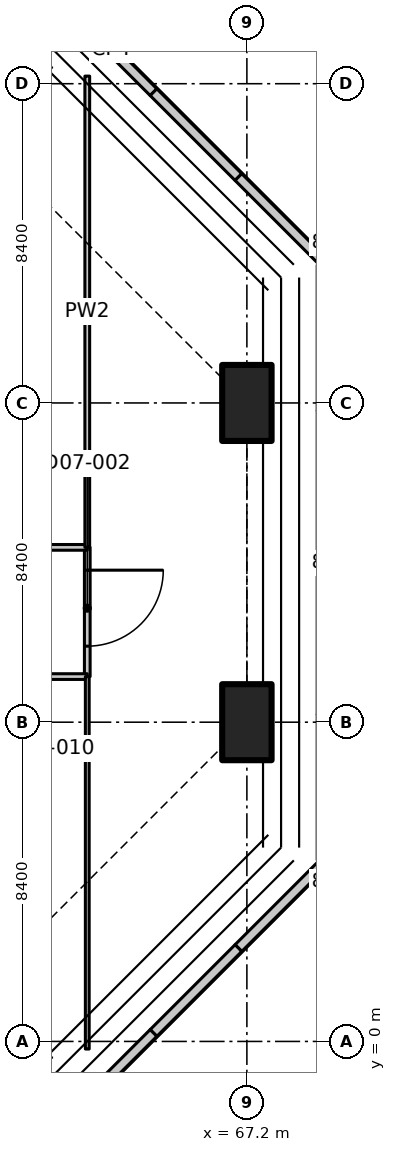
"""IFC4 building model, lengths in metres.
Left out: names, types, materials, properties, quantities, classifications, styles, units other than length and angle.
Written with IfcOpenShell. Run it as: python <this file> out.ifc"""

import sys

from ifc_helpers import new_model, si_unit, direction, frame, frame_2d, origin, origin_2d, place, context, subcontext, project, spatial, polyline, rectangle, outline, extrude, element, fill, save


model = new_model("IFC4")
c1 = context("Model", 3, precision=1e-05, world=origin(), true_north=direction((0.0, 1.0)))
c2 = subcontext(c1, "Body", "Model", "MODEL_VIEW")
j1 = project(units=[si_unit("LENGTHUNIT", "METRE"), si_unit("PLANEANGLEUNIT", "RADIAN")], contexts=[c1])
p1 = place(None, origin())
s1 = spatial("IfcSite", under=j1, at=p1, CompositionType="ELEMENT")
p2 = place(p1, origin())
s2 = spatial("IfcBuilding", under=s1, at=p2, CompositionType="ELEMENT")
p3 = place(p2, frame((0.0, 0.0, 36.5)))
s3 = spatial("IfcBuildingStorey", under=s2, at=p3, CompositionType="ELEMENT", Elevation=36.5)
for number, where, z_axis, x_axis in (
    (1, (67.2, 8.4, 0.0), (0.0, 0.0, 1.0), (1.0, 0.0, 0.0)),
    (2, (67.2, 16.8, 0.0), (0.0, 0.0, 1.0), (1.0, 0.0, 0.0)),
):
    element("IfcColumn", number, at=place(p3, frame(where, z_axis=z_axis, x_axis=x_axis)), inside=s3, PredefinedType="COLUMN", context=c2, shape_type="SweptSolid", body=[
        extrude(rectangle(XDim=1.3, YDim=2.0, at=origin_2d()), origin(), (0.0, 0.0, 1.0), 3.35),
    ])
p4 = place(p3, frame((62.509, 27.212, 0.0), z_axis=(0.0, 0.0, 1.0), x_axis=(0.70706814675, -0.707145413513, 0.0)))
e3 = element("IfcWall", 3, at=p4, inside=s3, PredefinedType="PARAPET", context=c2, shape_type="SweptSolid", body=[
    extrude(rectangle(XDim=3.16, YDim=0.25, at=frame_2d((1.58, 0.0))), origin(), (0.0, 0.0, 1.0), 1.1),
])
p5 = place(p3, frame((64.743, 24.977, 0.0), z_axis=(0.0, 0.0, 1.0), x_axis=(0.707106781187, -0.707106781187, 0.0)))
e4 = element("IfcWall", 4, at=p5, inside=s3, PredefinedType="PARAPET", context=c2, shape_type="SweptSolid", body=[
    extrude(rectangle(XDim=3.16, YDim=0.25, at=frame_2d((1.58, 0.0))), origin(), (0.0, 0.0, 1.0), 1.1),
])
p6 = place(p3, frame((66.977, 22.743, 0.0), z_axis=(0.0, 0.0, 1.0), x_axis=(0.707145413513, -0.70706814675, 0.0)))
e5 = element("IfcWall", 5, at=p6, inside=s3, PredefinedType="PARAPET", context=c2, shape_type="SweptSolid", body=[
    extrude(rectangle(XDim=3.16, YDim=0.25, at=frame_2d((1.58, 0.0))), origin(), (0.0, 0.0, 1.0), 1.1),
])
for number, where, z_axis, x_axis in (
    (6, (69.212, 4.691, 0.0), (0.0, 0.0, 1.0), (-0.707, -0.707, 0.0)),
    (7, (66.977, 2.457, 0.0), (0.0, 0.0, 1.0), (-0.707, -0.707, 0.0)),
):
    element("IfcWall", number, at=place(p3, frame(where, z_axis=z_axis, x_axis=x_axis)), inside=s3, PredefinedType="PARAPET", context=c2, shape_type="SweptSolid", body=[
        extrude(rectangle(XDim=3.16, YDim=0.25, at=frame_2d((1.58, 0.0))), origin(), (0.0, 0.0, 1.0), 1.1),
    ])
p7 = place(p3, frame((64.743, 0.223, 0.0), z_axis=(0.0, 0.0, 1.0), x_axis=(-0.70706814675, -0.707145413513, 0.0)))
e8 = element("IfcWall", 8, at=p7, inside=s3, PredefinedType="PARAPET", context=c2, shape_type="SweptSolid", body=[
    extrude(rectangle(XDim=3.16, YDim=0.25, at=frame_2d((1.58, 0.0))), origin(), (0.0, 0.0, 1.0), 1.1),
])
p8 = place(p3, frame((63.0, 13.0, 0.0), z_axis=(0.0, 0.0, 1.0), x_axis=(0.0, -1.0, 0.0)))
e9 = element("IfcWall", 9, at=p8, inside=s3, PredefinedType="PARTITIONING", context=c2, shape_type="SweptSolid", body=[
    extrude(rectangle(XDim=3.4, YDim=0.15, at=frame_2d((1.7, 0.0))), origin(), (0.0, 0.0, 1.0), 3.33),
])
p9 = place(p8, frame((0.6, 0.0, 0.0)))
e10 = element("IfcOpeningElement", 10, at=p9, cuts=e9, PredefinedType="OPENING", context=c2, shape_type="SweptSolid", body=[
    extrude(rectangle(XDim=2.0, YDim=2.4, at=frame_2d((1.0, 1.2))), frame((0.0, 0.085, 0.0), z_axis=(0.0, -1.0, 0.0), x_axis=(1.0, 0.0, 0.0)), (0.0, 0.0, 1.0), 0.17),
])
p10 = place(p3, frame((63.0, 9.6, 0.0), z_axis=(0.0, 0.0, 1.0), x_axis=(-1.0, 0.0, 0.0)))
e11 = element("IfcWall", 11, at=p10, inside=s3, PredefinedType="PARTITIONING", context=c2, shape_type="SweptSolid", body=[
    extrude(rectangle(XDim=4.2, YDim=0.15, at=frame_2d((2.1, 0.0))), origin(), (0.0, 0.0, 1.0), 3.33),
])
p11 = place(p10, frame((1.5, 0.0, 0.0)))
e12 = element("IfcOpeningElement", 12, at=p11, cuts=e11, PredefinedType="OPENING", context=c2, shape_type="SweptSolid", body=[
    extrude(rectangle(XDim=1.1, YDim=2.1, at=frame_2d((0.55, 1.05))), frame((0.0, 0.085, 0.0), z_axis=(0.0, -1.0, 0.0), x_axis=(1.0, 0.0, 0.0)), (0.0, 0.0, 1.0), 0.17),
])
p12 = place(p3, frame((54.6, 13.0, 0.0), z_axis=(0.0, 0.0, 1.0), x_axis=(1.0, 0.0, 0.0)))
e13 = element("IfcWall", 13, at=p12, inside=s3, PredefinedType="PARTITIONING", context=c2, shape_type="SweptSolid", body=[
    extrude(rectangle(XDim=8.4, YDim=0.15, at=frame_2d((4.2, 0.0))), origin(), (0.0, 0.0, 1.0), 3.33),
])
p13 = place(p12, frame((3.3, 0.0, 0.0)))
e14 = element("IfcOpeningElement", 14, at=p13, cuts=e13, PredefinedType="OPENING", context=c2, shape_type="SweptSolid", body=[
    extrude(rectangle(XDim=1.6, YDim=2.1, at=frame_2d((0.8, 1.05))), frame((0.0, 0.085, 0.0), z_axis=(0.0, -1.0, 0.0), x_axis=(1.0, 0.0, 0.0)), (0.0, 0.0, 1.0), 0.17),
])
p14 = place(p3, frame((63.0, -0.2, 0.0), z_axis=(0.0, 0.0, 1.0), x_axis=(0.0, 1.0, 0.0)))
e15 = element("IfcWall", 15, at=p14, inside=s3, PredefinedType="PARTITIONING", context=c2, shape_type="SweptSolid", body=[
    extrude(outline(polyline([(0.0, 0.0), (9.8, 0.0), (9.8, 3.33), (5.066, 3.33), (5.064, 2.98), (3.736, 2.98), (3.734, 3.33), (0.0, 3.33), (0.0, 0.0)])), frame((0.0, 0.05, 0.0), z_axis=(0.0, -1.0, 0.0), x_axis=(1.0, 0.0, 0.0)), (0.0, 0.0, 1.0), 0.1),
])
p15 = place(p3, frame((63.0, 13.0, 0.0), z_axis=(0.0, 0.0, 1.0), x_axis=(0.0, 1.0, 0.0)))
e16 = element("IfcWall", 16, at=p15, inside=s3, PredefinedType="PARTITIONING", context=c2, shape_type="SweptSolid", body=[
    extrude(outline(polyline([(0.0, 0.0), (12.4, 0.0), (12.4, 3.33), (8.678, 3.33), (8.676, 2.98), (7.324, 2.98), (7.322, 3.33), (0.0, 3.33), (0.0, 0.0)])), frame((0.0, 0.062, 0.0), z_axis=(0.0, -1.0, 0.0), x_axis=(1.0, 0.0, 0.0)), (0.0, 0.0, 1.0), 0.125),
])
p16 = place(p9, origin())
e17 = element("IfcDoor", 17, at=p16, inside=s3, OperationType="DOUBLE_DOOR_SINGLE_SWING", PredefinedType="DOOR", context=c2, shape_type="SweptSolid", body=[
    extrude(rectangle(XDim=2.0, YDim=2.4, at=frame_2d((1.0, 1.2))), frame((0.0, 0.025, 0.0), z_axis=(0.0, -1.0, 0.0), x_axis=(1.0, 0.0, 0.0)), (0.0, 0.0, 1.0), 0.05),
])
fill(e10, e17)
save(model, sys.argv[1])
